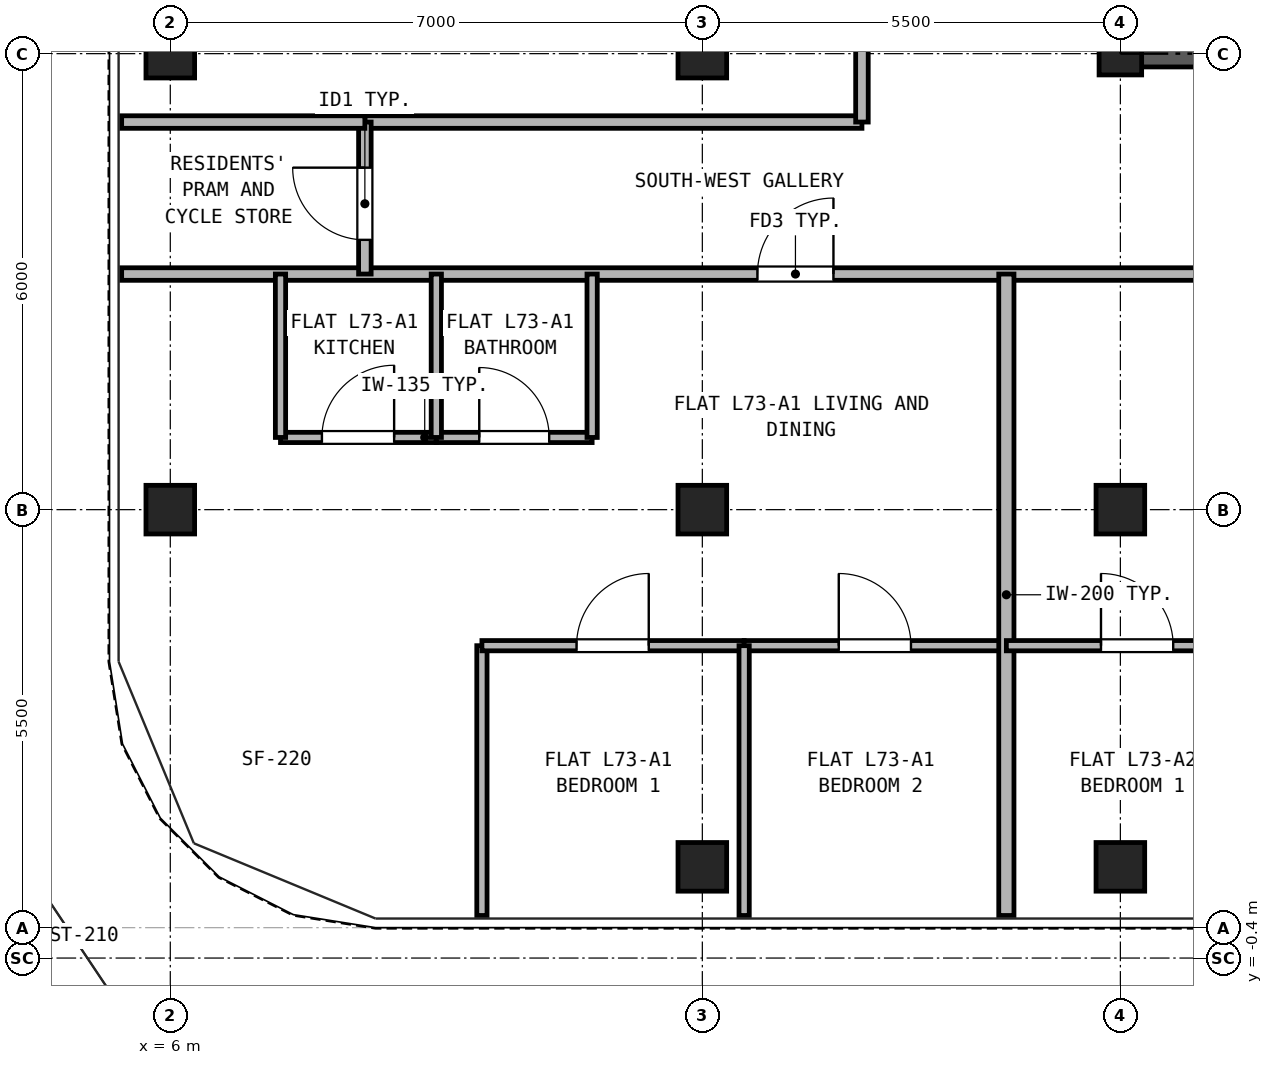
"""IFC4 building model, lengths in metres.
Left out: names, types, materials, properties, quantities, classifications, styles, units other than length and angle.
Written with IfcOpenShell. Run it as: python <this file> out.ifc"""

import sys

from ifc_helpers import new_model, si_unit, direction, frame, frame_2d, origin, origin_2d, place, context, subcontext, project, spatial, rectangle, hollow_rectangle, extrude, source, transform, mapped, element, fill, save


model = new_model("IFC4")
c1 = context("Model", 3, precision=1e-05, world=origin(), true_north=direction((0.0, 1.0)))
c2 = subcontext(c1, "Body", "Model", "MODEL_VIEW")
j1 = project(units=[si_unit("LENGTHUNIT", "METRE"), si_unit("PLANEANGLEUNIT", "RADIAN")], contexts=[c1])
p1 = place(None, origin())
s1 = spatial("IfcSite", under=j1, at=p1, CompositionType="ELEMENT")
p2 = place(p1, origin())
s2 = spatial("IfcBuilding", under=s1, at=p2, CompositionType="ELEMENT")
p3 = place(p2, frame((0.0, 0.0, 255.3)))
s3 = spatial("IfcBuildingStorey", under=s2, at=p3, CompositionType="ELEMENT", Elevation=255.3)
m1 = source(origin(), c2, "Body", "SweptSolid", [
    extrude(hollow_rectangle(XDim=0.64, YDim=0.64, WallThickness=0.035, at=origin_2d()), origin(), (0.0, 0.0, 1.0), 2.98),
])
for number, where, z_axis, x_axis in (
    (1, (13.0, 0.8, 0.0), (0.0, 0.0, 1.0), (1.0, 0.0, 0.0)),
    (2, (18.5, 0.8, 0.0), (0.0, 0.0, 1.0), (1.0, 0.0, 0.0)),
    (3, (6.0, 5.5, 0.0), (0.0, 0.0, 1.0), (1.0, 0.0, 0.0)),
    (4, (6.0, 11.5, 0.0), (0.0, 0.0, 1.0), (1.0, 0.0, 0.0)),
    (5, (13.0, 5.5, 0.0), (0.0, 0.0, 1.0), (1.0, 0.0, 0.0)),
    (6, (13.0, 11.5, 0.0), (0.0, 0.0, 1.0), (1.0, 0.0, 0.0)),
    (7, (18.5, 5.5, 0.0), (0.0, 0.0, 1.0), (1.0, 0.0, 0.0)),
):
    element("IfcColumn", number, at=place(p3, frame(where, z_axis=z_axis, x_axis=x_axis)), inside=s3, PredefinedType="COLUMN", context=c2, shape_type="MappedRepresentation", body=[
        mapped(m1, transform((0.0, 0.0, 0.0), x_axis=(1.0, 0.0, 0.0), y_axis=(0.0, 1.0, 0.0), z_axis=(0.0, 0.0, 1.0), scale=1.0)),
    ])
m2 = source(origin(), c2, "Body", "SweptSolid", [
    extrude(hollow_rectangle(XDim=0.56, YDim=0.56, WallThickness=0.03, at=origin_2d()), origin(), (0.0, 0.0, 1.0), 2.98),
])
p4 = place(p3, frame((18.5, 11.5, 0.0), z_axis=(0.0, 0.0, 1.0), x_axis=(1.0, 0.0, 0.0)))
e8 = element("IfcColumn", 8, at=p4, inside=s3, PredefinedType="COLUMN", context=c2, shape_type="MappedRepresentation", body=[
    mapped(m2, transform((0.0, 0.0, 0.0), x_axis=(1.0, 0.0, 0.0), y_axis=(0.0, 1.0, 0.0), z_axis=(0.0, 0.0, 1.0), scale=1.0)),
])
p5 = place(p3, frame((18.325, 11.5, 0.0), z_axis=(0.0, 0.0, 1.0), x_axis=(1.0, 0.0, 0.0)))
e9 = element("IfcWall", 9, at=p5, inside=s3, PredefinedType="SHEAR", context=c2, shape_type="SweptSolid", body=[
    extrude(rectangle(XDim=10.35, YDim=0.35, at=frame_2d((5.175, 0.0))), origin(), (0.0, 0.0, 1.0), 2.98),
])
p6 = place(p5, frame((1.775, 0.0, 0.0)))
e10 = element("IfcOpeningElement", 10, at=p6, cuts=e9, PredefinedType="OPENING", context=c2, shape_type="SweptSolid", body=[
    extrude(rectangle(XDim=0.95, YDim=2.15, at=frame_2d((0.475, 1.075))), frame((0.0, 0.185, 0.0), z_axis=(0.0, -1.0, 0.0), x_axis=(1.0, 0.0, 0.0)), (0.0, 0.0, 1.0), 0.37),
])
p7 = place(p5, frame((5.275, 0.0, 0.0)))
e11 = element("IfcOpeningElement", 11, at=p7, cuts=e9, PredefinedType="OPENING", context=c2, shape_type="SweptSolid", body=[
    extrude(rectangle(XDim=0.95, YDim=2.15, at=frame_2d((0.475, 1.075))), frame((0.0, 0.185, 0.0), z_axis=(0.0, -1.0, 0.0), x_axis=(1.0, 0.0, 0.0)), (0.0, 0.0, 1.0), 0.37),
])
p8 = place(p5, frame((8.175, 0.0, 0.0)))
e12 = element("IfcOpeningElement", 12, at=p8, cuts=e9, PredefinedType="OPENING", context=c2, shape_type="SweptSolid", body=[
    extrude(rectangle(XDim=1.1, YDim=2.25, at=frame_2d((0.55, 1.125))), frame((0.0, 0.185, 0.0), z_axis=(0.0, -1.0, 0.0), x_axis=(1.0, 0.0, 0.0)), (0.0, 0.0, 1.0), 0.37),
])
p9 = place(p3, frame((5.36, 8.6, 0.0), z_axis=(0.0, 0.0, 1.0), x_axis=(1.0, 0.0, 0.0)))
e13 = element("IfcWall", 13, at=p9, inside=s3, PredefinedType="PARTITIONING", context=c2, shape_type="SweptSolid", body=[
    extrude(rectangle(XDim=36.28, YDim=0.165, at=frame_2d((18.14, 0.0))), origin(), (0.0, 0.0, 1.0), 2.655),
])
p10 = place(p9, frame((8.365, 0.0, 0.0)))
e14 = element("IfcOpeningElement", 14, at=p10, cuts=e13, PredefinedType="OPENING", context=c2, shape_type="SweptSolid", body=[
    extrude(rectangle(XDim=1.0, YDim=2.15, at=frame_2d((0.5, 1.075))), frame((0.0, 0.093, 0.0), z_axis=(0.0, -1.0, 0.0), x_axis=(1.0, 0.0, 0.0)), (0.0, 0.0, 1.0), 0.185),
])
p11 = place(p9, frame((14.165, 0.0, 0.0)))
e15 = element("IfcOpeningElement", 15, at=p11, cuts=e13, PredefinedType="OPENING", context=c2, shape_type="SweptSolid", body=[
    extrude(rectangle(XDim=1.0, YDim=2.15, at=frame_2d((0.5, 1.075))), frame((0.0, 0.093, 0.0), z_axis=(0.0, -1.0, 0.0), x_axis=(1.0, 0.0, 0.0)), (0.0, 0.0, 1.0), 0.185),
])
p12 = place(p9, frame((26.415, 0.0, 0.0)))
e16 = element("IfcOpeningElement", 16, at=p12, cuts=e13, PredefinedType="OPENING", context=c2, shape_type="SweptSolid", body=[
    extrude(rectangle(XDim=1.0, YDim=2.15, at=frame_2d((0.5, 1.075))), frame((0.0, 0.093, 0.0), z_axis=(0.0, -1.0, 0.0), x_axis=(1.0, 0.0, 0.0)), (0.0, 0.0, 1.0), 0.185),
])
p13 = place(p3, frame((8.56, 10.6, 0.0), z_axis=(0.0, 0.0, 1.0), x_axis=(1.0, 0.0, 0.0)))
e17 = element("IfcWall", 17, at=p13, inside=s3, PredefinedType="PARTITIONING", context=c2, shape_type="SweptSolid", body=[
    extrude(rectangle(XDim=6.54, YDim=0.165, at=frame_2d((3.27, 0.0))), origin(), (0.0, 0.0, 1.0), 2.98),
])
p14 = place(p3, frame((8.56, 8.6, 0.0), z_axis=(0.0, 0.0, 1.0), x_axis=(0.0, 1.0, 0.0)))
e18 = element("IfcWall", 18, at=p14, inside=s3, PredefinedType="PARTITIONING", context=c2, shape_type="SweptSolid", body=[
    extrude(rectangle(XDim=2.0, YDim=0.165, at=frame_2d((1.0, 0.0))), origin(), (0.0, 0.0, 1.0), 2.98),
])
p15 = place(p14, frame((0.45, 0.0, 0.0)))
e19 = element("IfcOpeningElement", 19, at=p15, cuts=e18, PredefinedType="OPENING", context=c2, shape_type="SweptSolid", body=[
    extrude(rectangle(XDim=0.95, YDim=2.15, at=frame_2d((0.475, 1.075))), frame((0.0, 0.093, 0.0), z_axis=(0.0, -1.0, 0.0), x_axis=(1.0, 0.0, 0.0)), (0.0, 0.0, 1.0), 0.185),
])
p16 = place(p3, frame((15.1, 10.6, 0.0), z_axis=(0.0, 0.0, 1.0), x_axis=(0.0, 1.0, 0.0)))
e20 = element("IfcWall", 20, at=p16, inside=s3, PredefinedType="PARTITIONING", context=c2, shape_type="SweptSolid", body=[
    extrude(rectangle(XDim=24.54, YDim=0.165, at=frame_2d((12.27, 0.0))), origin(), (0.0, 0.0, 1.0), 2.98),
])
p17 = place(p16, frame((3.45, 0.0, 0.0)))
e21 = element("IfcOpeningElement", 21, at=p17, cuts=e20, PredefinedType="OPENING", context=c2, shape_type="SweptSolid", body=[
    extrude(rectangle(XDim=0.95, YDim=2.15, at=frame_2d((0.475, 1.075))), frame((0.0, 0.093, 0.0), z_axis=(0.0, -1.0, 0.0), x_axis=(1.0, 0.0, 0.0)), (0.0, 0.0, 1.0), 0.185),
])
p18 = place(p16, frame((10.9, 0.0, 0.0)))
e22 = element("IfcOpeningElement", 22, at=p18, cuts=e20, PredefinedType="OPENING", context=c2, shape_type="SweptSolid", body=[
    extrude(rectangle(XDim=0.95, YDim=2.15, at=frame_2d((0.475, 1.075))), frame((0.0, 0.093, 0.0), z_axis=(0.0, -1.0, 0.0), x_axis=(1.0, 0.0, 0.0)), (0.0, 0.0, 1.0), 0.185),
])
p19 = place(p16, frame((16.75, 0.0, 0.0)))
e23 = element("IfcOpeningElement", 23, at=p19, cuts=e20, PredefinedType="OPENING", context=c2, shape_type="SweptSolid", body=[
    extrude(rectangle(XDim=0.95, YDim=2.15, at=frame_2d((0.475, 1.075))), frame((0.0, 0.093, 0.0), z_axis=(0.0, -1.0, 0.0), x_axis=(1.0, 0.0, 0.0)), (0.0, 0.0, 1.0), 0.185),
])
p20 = place(p16, frame((20.0, 0.0, 0.0)))
e24 = element("IfcOpeningElement", 24, at=p20, cuts=e20, PredefinedType="OPENING", context=c2, shape_type="SweptSolid", body=[
    extrude(rectangle(XDim=0.92, YDim=2.1, at=frame_2d((0.46, 1.05))), frame((0.0, 0.093, 0.0), z_axis=(0.0, -1.0, 0.0), x_axis=(1.0, 0.0, 0.0)), (0.0, 0.0, 1.0), 0.185),
])
p21 = place(p3, frame((7.45, 6.45, 0.0), z_axis=(0.0, 0.0, 1.0), x_axis=(1.0, 0.0, 0.0)))
e25 = element("IfcWall", 25, at=p21, inside=s3, PredefinedType="PARTITIONING", context=c2, shape_type="SweptSolid", body=[
    extrude(rectangle(XDim=2.05, YDim=0.135, at=frame_2d((1.025, 0.0))), origin(), (0.0, 0.0, 1.0), 2.98),
])
p22 = place(p21, frame((0.545, 0.0, 0.0)))
e26 = element("IfcOpeningElement", 26, at=p22, cuts=e25, PredefinedType="OPENING", context=c2, shape_type="SweptSolid", body=[
    extrude(rectangle(XDim=0.95, YDim=2.15, at=frame_2d((0.475, 1.075))), frame((0.0, 0.077, 0.0), z_axis=(0.0, -1.0, 0.0), x_axis=(1.0, 0.0, 0.0)), (0.0, 0.0, 1.0), 0.155),
])
p23 = place(p3, frame((9.5, 6.45, 0.0), z_axis=(0.0, 0.0, 1.0), x_axis=(1.0, 0.0, 0.0)))
e27 = element("IfcWall", 27, at=p23, inside=s3, PredefinedType="PARTITIONING", context=c2, shape_type="SweptSolid", body=[
    extrude(rectangle(XDim=2.05, YDim=0.135, at=frame_2d((1.025, 0.0))), origin(), (0.0, 0.0, 1.0), 2.98),
])
p24 = place(p23, frame((0.565, 0.0, 0.0)))
e28 = element("IfcOpeningElement", 28, at=p24, cuts=e27, PredefinedType="OPENING", context=c2, shape_type="SweptSolid", body=[
    extrude(rectangle(XDim=0.92, YDim=2.1, at=frame_2d((0.46, 1.05))), frame((0.0, 0.077, 0.0), z_axis=(0.0, -1.0, 0.0), x_axis=(1.0, 0.0, 0.0)), (0.0, 0.0, 1.0), 0.155),
])
for number, where, z_axis, x_axis in (
    (29, (7.45, 6.45, 0.0), (0.0, 0.0, 1.0), (0.0, 1.0, 0.0)),
    (30, (9.5, 6.45, 0.0), (0.0, 0.0, 1.0), (0.0, 1.0, 0.0)),
    (31, (11.55, 6.45, 0.0), (0.0, 0.0, 1.0), (0.0, 1.0, 0.0)),
):
    element("IfcWall", number, at=place(p3, frame(where, z_axis=z_axis, x_axis=x_axis)), inside=s3, PredefinedType="PARTITIONING", context=c2, shape_type="SweptSolid", body=[
        extrude(rectangle(XDim=2.15, YDim=0.135, at=frame_2d((1.075, 0.0))), origin(), (0.0, 0.0, 1.0), 2.98),
    ])
p25 = place(p3, frame((10.1, 0.16, 0.0), z_axis=(0.0, 0.0, 1.0), x_axis=(0.0, 1.0, 0.0)))
e32 = element("IfcWall", 32, at=p25, inside=s3, PredefinedType="PARTITIONING", context=c2, shape_type="SweptSolid", body=[
    extrude(rectangle(XDim=3.55, YDim=0.135, at=frame_2d((1.775, 0.0))), origin(), (0.0, 0.0, 1.0), 2.98),
])
p26 = place(p3, frame((10.1, 3.71, 0.0), z_axis=(0.0, 0.0, 1.0), x_axis=(1.0, 0.0, 0.0)))
e33 = element("IfcWall", 33, at=p26, inside=s3, PredefinedType="PARTITIONING", context=c2, shape_type="SweptSolid", body=[
    extrude(rectangle(XDim=3.45, YDim=0.135, at=frame_2d((1.725, 0.0))), origin(), (0.0, 0.0, 1.0), 2.98),
])
p27 = place(p26, frame((1.245, 0.0, 0.0)))
e34 = element("IfcOpeningElement", 34, at=p27, cuts=e33, PredefinedType="OPENING", context=c2, shape_type="SweptSolid", body=[
    extrude(rectangle(XDim=0.95, YDim=2.15, at=frame_2d((0.475, 1.075))), frame((0.0, 0.077, 0.0), z_axis=(0.0, -1.0, 0.0), x_axis=(1.0, 0.0, 0.0)), (0.0, 0.0, 1.0), 0.155),
])
p28 = place(p3, frame((13.55, 3.71, 0.0), z_axis=(0.0, 0.0, 1.0), x_axis=(1.0, 0.0, 0.0)))
e35 = element("IfcWall", 35, at=p28, inside=s3, PredefinedType="PARTITIONING", context=c2, shape_type="SweptSolid", body=[
    extrude(rectangle(XDim=3.45, YDim=0.135, at=frame_2d((1.725, 0.0))), origin(), (0.0, 0.0, 1.0), 2.98),
])
p29 = place(p28, frame((1.245, 0.0, 0.0)))
e36 = element("IfcOpeningElement", 36, at=p29, cuts=e35, PredefinedType="OPENING", context=c2, shape_type="SweptSolid", body=[
    extrude(rectangle(XDim=0.95, YDim=2.15, at=frame_2d((0.475, 1.075))), frame((0.0, 0.077, 0.0), z_axis=(0.0, -1.0, 0.0), x_axis=(1.0, 0.0, 0.0)), (0.0, 0.0, 1.0), 0.155),
])
p30 = place(p3, frame((13.55, 0.16, 0.0), z_axis=(0.0, 0.0, 1.0), x_axis=(0.0, 1.0, 0.0)))
e37 = element("IfcWall", 37, at=p30, inside=s3, PredefinedType="PARTITIONING", context=c2, shape_type="SweptSolid", body=[
    extrude(rectangle(XDim=3.55, YDim=0.135, at=frame_2d((1.775, 0.0))), origin(), (0.0, 0.0, 1.0), 2.98),
])
p31 = place(p3, frame((17.0, 0.16, 0.0), z_axis=(0.0, 0.0, 1.0), x_axis=(0.0, 1.0, 0.0)))
e38 = element("IfcWall", 38, at=p31, inside=s3, PredefinedType="PARTITIONING", context=c2, shape_type="SweptSolid", body=[
    extrude(rectangle(XDim=8.44, YDim=0.2, at=frame_2d((4.22, 0.0))), origin(), (0.0, 0.0, 1.0), 2.98),
])
p32 = place(p3, frame((17.0, 3.71, 0.0), z_axis=(0.0, 0.0, 1.0), x_axis=(1.0, 0.0, 0.0)))
e39 = element("IfcWall", 39, at=p32, inside=s3, PredefinedType="PARTITIONING", context=c2, shape_type="SweptSolid", body=[
    extrude(rectangle(XDim=3.45, YDim=0.135, at=frame_2d((1.725, 0.0))), origin(), (0.0, 0.0, 1.0), 2.98),
])
p33 = place(p32, frame((1.245, 0.0, 0.0)))
e40 = element("IfcOpeningElement", 40, at=p33, cuts=e39, PredefinedType="OPENING", context=c2, shape_type="SweptSolid", body=[
    extrude(rectangle(XDim=0.95, YDim=2.15, at=frame_2d((0.475, 1.075))), frame((0.0, 0.077, 0.0), z_axis=(0.0, -1.0, 0.0), x_axis=(1.0, 0.0, 0.0)), (0.0, 0.0, 1.0), 0.155),
])
p34 = place(p3, frame((5.36, 10.6, 0.0), z_axis=(0.0, 0.0, 1.0), x_axis=(1.0, 0.0, 0.0)))
e41 = element("IfcWall", 41, at=p34, inside=s3, PredefinedType="PARTITIONING", context=c2, shape_type="SweptSolid", body=[
    extrude(rectangle(XDim=3.2, YDim=0.165, at=frame_2d((1.6, 0.0))), origin(), (0.0, 0.0, 1.0), 2.98),
])
p35 = place(p22, origin())
e42 = element("IfcDoor", 42, at=p35, inside=s3, OperationType="SINGLE_SWING_RIGHT", PredefinedType="DOOR", context=c2, shape_type="SweptSolid", body=[
    extrude(rectangle(XDim=0.95, YDim=2.15, at=frame_2d((0.475, 1.075))), frame((0.0, 0.025, 0.0), z_axis=(0.0, -1.0, 0.0), x_axis=(1.0, 0.0, 0.0)), (0.0, 0.0, 1.0), 0.05),
])
fill(e26, e42)
p36 = place(p24, origin())
e43 = element("IfcDoor", 43, at=p36, inside=s3, OperationType="SINGLE_SWING_LEFT", PredefinedType="DOOR", context=c2, shape_type="SweptSolid", body=[
    extrude(rectangle(XDim=0.92, YDim=2.1, at=frame_2d((0.46, 1.05))), frame((0.0, 0.025, 0.0), z_axis=(0.0, -1.0, 0.0), x_axis=(1.0, 0.0, 0.0)), (0.0, 0.0, 1.0), 0.05),
])
fill(e28, e43)
p37 = place(p27, frame((0.95, 0.0, 0.0), z_axis=(0.0, 0.0, 1.0), x_axis=(-1.0, 0.0, 0.0)))
e44 = element("IfcDoor", 44, at=p37, inside=s3, OperationType="SINGLE_SWING_RIGHT", PredefinedType="DOOR", context=c2, shape_type="SweptSolid", body=[
    extrude(rectangle(XDim=0.95, YDim=2.15, at=frame_2d((0.475, 1.075))), frame((0.0, 0.025, 0.0), z_axis=(0.0, -1.0, 0.0), x_axis=(1.0, 0.0, 0.0)), (0.0, 0.0, 1.0), 0.05),
])
fill(e34, e44)
p38 = place(p29, frame((0.95, 0.0, 0.0), z_axis=(0.0, 0.0, 1.0), x_axis=(-1.0, 0.0, 0.0)))
e45 = element("IfcDoor", 45, at=p38, inside=s3, OperationType="SINGLE_SWING_LEFT", PredefinedType="DOOR", context=c2, shape_type="SweptSolid", body=[
    extrude(rectangle(XDim=0.95, YDim=2.15, at=frame_2d((0.475, 1.075))), frame((0.0, 0.025, 0.0), z_axis=(0.0, -1.0, 0.0), x_axis=(1.0, 0.0, 0.0)), (0.0, 0.0, 1.0), 0.05),
])
fill(e36, e45)
p39 = place(p10, frame((1.0, 0.0, 0.0), z_axis=(0.0, 0.0, 1.0), x_axis=(-1.0, 0.0, 0.0)))
e46 = element("IfcDoor", 46, at=p39, inside=s3, OperationType="SINGLE_SWING_RIGHT", PredefinedType="DOOR", context=c2, shape_type="SweptSolid", body=[
    extrude(rectangle(XDim=1.0, YDim=2.15, at=frame_2d((0.5, 1.075))), frame((0.0, 0.025, 0.0), z_axis=(0.0, -1.0, 0.0), x_axis=(1.0, 0.0, 0.0)), (0.0, 0.0, 1.0), 0.05),
])
fill(e14, e46)
p40 = place(p33, frame((0.95, 0.0, 0.0), z_axis=(0.0, 0.0, 1.0), x_axis=(-1.0, 0.0, 0.0)))
e47 = element("IfcDoor", 47, at=p40, inside=s3, OperationType="SINGLE_SWING_LEFT", PredefinedType="DOOR", context=c2, shape_type="SweptSolid", body=[
    extrude(rectangle(XDim=0.95, YDim=2.15, at=frame_2d((0.475, 1.075))), frame((0.0, 0.025, 0.0), z_axis=(0.0, -1.0, 0.0), x_axis=(1.0, 0.0, 0.0)), (0.0, 0.0, 1.0), 0.05),
])
fill(e40, e47)
p41 = place(p15, frame((0.95, 0.0, 0.0), z_axis=(0.0, 0.0, 1.0), x_axis=(-1.0, 0.0, 0.0)))
e48 = element("IfcDoor", 48, at=p41, inside=s3, OperationType="SINGLE_SWING_RIGHT", PredefinedType="DOOR", context=c2, shape_type="SweptSolid", body=[
    extrude(rectangle(XDim=0.95, YDim=2.15, at=frame_2d((0.475, 1.075))), frame((0.0, 0.025, 0.0), z_axis=(0.0, -1.0, 0.0), x_axis=(1.0, 0.0, 0.0)), (0.0, 0.0, 1.0), 0.05),
])
fill(e19, e48)
save(model, sys.argv[1])
